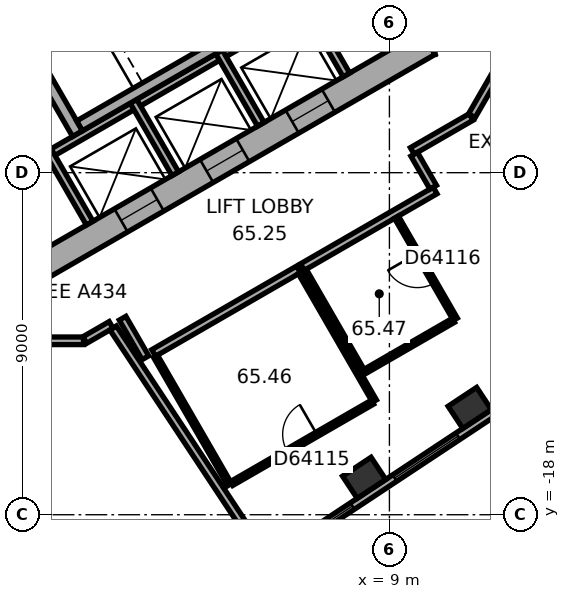
"""IFC4 building model, lengths in metres.
Left out: names, types, materials, properties, quantities, classifications, styles, units other than length and angle.
Written with IfcOpenShell. Run it as: python <this file> out.ifc"""

import sys

from ifc_helpers import new_model, si_unit, direction, frame, frame_2d, origin, origin_2d, place, context, subcontext, project, spatial, rectangle, extrude, element, fill, save


model = new_model("IFC4")
c1 = context("Model", 3, precision=1e-05, world=origin(), true_north=direction((0.0, 1.0)))
c2 = subcontext(c1, "Body", "Model", "MODEL_VIEW")
j1 = project(units=[si_unit("LENGTHUNIT", "METRE"), si_unit("PLANEANGLEUNIT", "RADIAN")], contexts=[c1])
p1 = place(None, origin())
s1 = spatial("IfcSite", under=j1, at=p1, CompositionType="ELEMENT")
p2 = place(p1, origin())
s2 = spatial("IfcBuilding", under=s1, at=p2, CompositionType="ELEMENT")
p3 = place(p2, frame((0.0, 0.0, 263.5)))
s3 = spatial("IfcBuildingStorey", under=s2, at=p3, CompositionType="ELEMENT", Elevation=263.5)
for number, where, z_axis, x_axis in (
    (1, (8.335, -17.028, 0.0), (0.0, 0.0, 1.0), (0.834, 0.552, 0.0)),
    (2, (11.113, -15.189, 0.0), (0.0, 0.0, 1.0), (0.834, 0.552, 0.0)),
):
    element("IfcColumn", number, at=place(p3, frame(where, z_axis=z_axis, x_axis=x_axis)), inside=s3, PredefinedType="COLUMN", context=c2, shape_type="SweptSolid", body=[
        extrude(rectangle(XDim=0.9, YDim=0.7, at=origin_2d()), origin(), (0.0, 0.0, 1.0), 3.7),
    ])
p4 = place(p3, frame((9.85, -5.889, 0.0), z_axis=(0.0, 0.0, 1.0), x_axis=(0.0, 1.0, 0.0)))
e3 = element("IfcWall", 3, at=p4, inside=s3, PredefinedType="SHEAR", context=c2, shape_type="SweptSolid", body=[
    extrude(rectangle(XDim=11.778, YDim=0.7, at=frame_2d((5.889, 0.0))), origin(), (0.0, 0.0, 1.0), 3.7),
])
p5 = place(p4, frame((6.089, 0.0, 0.0)))
e4 = element("IfcOpeningElement", 4, at=p5, cuts=e3, PredefinedType="OPENING", context=c2, shape_type="SweptSolid", body=[
    extrude(rectangle(XDim=1.5, YDim=2.1, at=frame_2d((0.75, 1.05))), frame((0.0, 0.36, 0.0), z_axis=(0.0, -1.0, 0.0), x_axis=(1.0, 0.0, 0.0)), (0.0, 0.0, 1.0), 0.72),
])
p6 = place(p4, frame((2.939, 0.0, 0.0)))
e5 = element("IfcOpeningElement", 5, at=p6, cuts=e3, PredefinedType="OPENING", context=c2, shape_type="SweptSolid", body=[
    extrude(rectangle(XDim=0.9, YDim=2.1, at=frame_2d((0.45, 1.05))), frame((0.0, 0.36, 0.0), z_axis=(0.0, -1.0, 0.0), x_axis=(1.0, 0.0, 0.0)), (0.0, 0.0, 1.0), 0.72),
])
p7 = place(p3, frame((-10.025, -5.586, 0.0), z_axis=(0.0, 0.0, 1.0), x_axis=(0.866026453023, -0.499998182661, 0.0)))
e6 = element("IfcWall", 6, at=p7, inside=s3, PredefinedType="SHEAR", context=c2, shape_type="SweptSolid", body=[
    extrude(rectangle(XDim=11.778, YDim=0.7, at=frame_2d((5.889, 0.0))), origin(), (0.0, 0.0, 1.0), 3.7),
])
p8 = place(p7, frame((6.089, 0.0, 0.0)))
e7 = element("IfcOpeningElement", 7, at=p8, cuts=e6, PredefinedType="OPENING", context=c2, shape_type="SweptSolid", body=[
    extrude(rectangle(XDim=1.5, YDim=2.1, at=frame_2d((0.75, 1.05))), frame((0.0, 0.36, 0.0), z_axis=(0.0, -1.0, 0.0), x_axis=(1.0, 0.0, 0.0)), (0.0, 0.0, 1.0), 0.72),
])
p9 = place(p7, frame((1.539, 0.0, 0.0)))
e8 = element("IfcOpeningElement", 8, at=p9, cuts=e6, PredefinedType="OPENING", context=c2, shape_type="SweptSolid", body=[
    extrude(rectangle(XDim=1.1, YDim=2.1, at=frame_2d((0.55, 1.05))), frame((0.0, 0.36, 0.0), z_axis=(0.0, -1.0, 0.0), x_axis=(1.0, 0.0, 0.0)), (0.0, 0.0, 1.0), 0.72),
])
p10 = place(p7, frame((4.139, 0.0, 0.0)))
e9 = element("IfcOpeningElement", 9, at=p10, cuts=e6, PredefinedType="OPENING", context=c2, shape_type="SweptSolid", body=[
    extrude(rectangle(XDim=1.1, YDim=2.1, at=frame_2d((0.55, 1.05))), frame((0.0, 0.36, 0.0), z_axis=(0.0, -1.0, 0.0), x_axis=(1.0, 0.0, 0.0)), (0.0, 0.0, 1.0), 0.72),
])
p11 = place(p3, frame((-0.175, -11.475, 0.0), z_axis=(0.0, 0.0, 1.0), x_axis=(0.866026453023, 0.499998182661, 0.0)))
e10 = element("IfcWall", 10, at=p11, inside=s3, PredefinedType="SHEAR", context=c2, shape_type="SweptSolid", body=[
    extrude(rectangle(XDim=11.778, YDim=0.7, at=frame_2d((5.889, 0.0))), origin(), (0.0, 0.0, 1.0), 3.7),
])
p12 = place(p11, frame((2.439, 0.0, 0.0)))
e11 = element("IfcOpeningElement", 11, at=p12, cuts=e10, PredefinedType="OPENING", context=c2, shape_type="SweptSolid", body=[
    extrude(rectangle(XDim=1.1, YDim=2.1, at=frame_2d((0.55, 1.05))), frame((0.0, 0.36, 0.0), z_axis=(0.0, -1.0, 0.0), x_axis=(1.0, 0.0, 0.0)), (0.0, 0.0, 1.0), 0.72),
])
p13 = place(p11, frame((5.039, 0.0, 0.0)))
e12 = element("IfcOpeningElement", 12, at=p13, cuts=e10, PredefinedType="OPENING", context=c2, shape_type="SweptSolid", body=[
    extrude(rectangle(XDim=1.1, YDim=2.1, at=frame_2d((0.55, 1.05))), frame((0.0, 0.36, 0.0), z_axis=(0.0, -1.0, 0.0), x_axis=(1.0, 0.0, 0.0)), (0.0, 0.0, 1.0), 0.72),
])
p14 = place(p11, frame((7.639, 0.0, 0.0)))
e13 = element("IfcOpeningElement", 13, at=p14, cuts=e10, PredefinedType="OPENING", context=c2, shape_type="SweptSolid", body=[
    extrude(rectangle(XDim=1.1, YDim=2.1, at=frame_2d((0.55, 1.05))), frame((0.0, 0.36, 0.0), z_axis=(0.0, -1.0, 0.0), x_axis=(1.0, 0.0, 0.0)), (0.0, 0.0, 1.0), 0.72),
])
p15 = place(p3, frame((2.58, -21.377, 0.0), z_axis=(0.0, 0.0, 1.0), x_axis=(0.833888592176, 0.551932800112, 0.0)))
e14 = element("IfcWall", 14, at=p15, inside=s3, PredefinedType="STANDARD", context=c2, shape_type="SweptSolid", body=[
    extrude(rectangle(XDim=17.731, YDim=0.2, at=frame_2d((8.866, 0.0))), origin(), (0.0, 0.0, 1.0), 3.7),
])
p16 = place(p15, frame((1.202, 0.0, 0.9)))
e15 = element("IfcOpeningElement", 15, at=p16, cuts=e14, PredefinedType="OPENING", context=c2, shape_type="SweptSolid", body=[
    extrude(rectangle(XDim=2.0, YDim=2.0, at=frame_2d((1.0, 1.0))), frame((0.0, 0.11, 0.0), z_axis=(0.0, -1.0, 0.0), x_axis=(1.0, 0.0, 0.0)), (0.0, 0.0, 1.0), 0.22),
])
p17 = place(p15, frame((4.533, 0.0, 0.9)))
e16 = element("IfcOpeningElement", 16, at=p17, cuts=e14, PredefinedType="OPENING", context=c2, shape_type="SweptSolid", body=[
    extrude(rectangle(XDim=2.0, YDim=2.0, at=frame_2d((1.0, 1.0))), frame((0.0, 0.11, 0.0), z_axis=(0.0, -1.0, 0.0), x_axis=(1.0, 0.0, 0.0)), (0.0, 0.0, 1.0), 0.22),
])
p18 = place(p15, frame((7.865, 0.0, 0.9)))
e17 = element("IfcOpeningElement", 17, at=p18, cuts=e14, PredefinedType="OPENING", context=c2, shape_type="SweptSolid", body=[
    extrude(rectangle(XDim=2.0, YDim=2.0, at=frame_2d((1.0, 1.0))), frame((0.0, 0.11, 0.0), z_axis=(0.0, -1.0, 0.0), x_axis=(1.0, 0.0, 0.0)), (0.0, 0.0, 1.0), 0.22),
])
p19 = place(p15, frame((11.197, 0.0, 0.9)))
e18 = element("IfcOpeningElement", 18, at=p19, cuts=e14, PredefinedType="OPENING", context=c2, shape_type="SweptSolid", body=[
    extrude(rectangle(XDim=2.0, YDim=2.0, at=frame_2d((1.0, 1.0))), frame((0.0, 0.11, 0.0), z_axis=(0.0, -1.0, 0.0), x_axis=(1.0, 0.0, 0.0)), (0.0, 0.0, 1.0), 0.22),
])
p20 = place(p15, frame((14.528, 0.0, 0.9)))
e19 = element("IfcOpeningElement", 19, at=p20, cuts=e14, PredefinedType="OPENING", context=c2, shape_type="SweptSolid", body=[
    extrude(rectangle(XDim=2.0, YDim=2.0, at=frame_2d((1.0, 1.0))), frame((0.0, 0.11, 0.0), z_axis=(0.0, -1.0, 0.0), x_axis=(1.0, 0.0, 0.0)), (0.0, 0.0, 1.0), 0.22),
])
p21 = place(p3, frame((-0.024, -8.559, 0.0), z_axis=(0.0, 0.0, 1.0), x_axis=(0.866026010844, 0.49999894854, 0.0)))
e20 = element("IfcWall", 20, at=p21, inside=s3, PredefinedType="PARTITIONING", context=c2, shape_type="SweptSolid", body=[
    extrude(rectangle(XDim=8.0, YDim=0.2, at=frame_2d((4.0, 0.0))), origin(), (0.0, 0.0, 1.0), 3.42),
])
for number, where, z_axis, x_axis in (
    (21, (0.013, -8.422, 0.0), (0.0, 0.0, 1.0), (0.5, -0.866, 0.0)),
    (22, (2.264, -7.122, 0.0), (0.0, 0.0, 1.0), (0.5, -0.866, 0.0)),
    (23, (4.516, -5.822, 0.0), (0.0, 0.0, 1.0), (0.5, -0.866, 0.0)),
    (24, (6.768, -4.522, 0.0), (0.0, 0.0, 1.0), (0.5, -0.866, 0.0)),
):
    element("IfcWall", number, at=place(p3, frame(where, z_axis=z_axis, x_axis=x_axis)), inside=s3, PredefinedType="PARTITIONING", context=c2, shape_type="SweptSolid", body=[
        extrude(rectangle(XDim=2.2, YDim=0.2, at=frame_2d((1.1, 0.0))), origin(), (0.0, 0.0, 1.0), 3.42),
    ])
p22 = place(p3, frame((-1.558, -3.902, 0.0), z_axis=(0.0, 0.0, 1.0), x_axis=(0.499977259774, -0.866038532462, 0.0)))
e25 = element("IfcWall", 25, at=p22, inside=s3, PredefinedType="SHEAR", context=c2, shape_type="SweptSolid", body=[
    extrude(rectangle(XDim=4.7, YDim=0.3, at=frame_2d((2.35, 0.0))), origin(), (0.0, 0.0, 1.0), 3.42),
])
p23 = place(p22, frame((0.8, 0.0, 0.0)))
e26 = element("IfcOpeningElement", 26, at=p23, cuts=e25, PredefinedType="OPENING", context=c2, shape_type="SweptSolid", body=[
    extrude(rectangle(XDim=1.2, YDim=2.1, at=frame_2d((0.6, 1.05))), frame((0.0, 0.16, 0.0), z_axis=(0.0, -1.0, 0.0), x_axis=(1.0, 0.0, 0.0)), (0.0, 0.0, 1.0), 0.32),
])
p24 = place(p3, frame((0.847, -7.767, 0.0), z_axis=(0.0, 0.0, 1.0), x_axis=(0.866027801685, 0.499995846692, 0.0)))
e27 = element("IfcWall", 27, at=p24, inside=s3, PredefinedType="SHEAR", context=c2, shape_type="SweptSolid", body=[
    extrude(rectangle(XDim=7.06, YDim=0.3, at=frame_2d((3.53, 0.0))), origin(), (0.0, 0.0, 1.0), 3.42),
])
p25 = place(p3, frame((-0.91, -13.423, 0.0), z_axis=(0.0, 0.0, 1.0), x_axis=(1.0, 0.0, 0.0)))
e28 = element("IfcWall", 28, at=p25, inside=s3, PredefinedType="PARTITIONING", context=c2, shape_type="SweptSolid", body=[
    extrude(rectangle(XDim=1.86, YDim=0.2, at=frame_2d((0.93, 0.0))), origin(), (0.0, 0.0, 1.0), 3.42),
])
p26 = place(p3, frame((0.985, -13.403, 0.0), z_axis=(0.0, 0.0, 1.0), x_axis=(0.866032814021, 0.499987164874, 0.0)))
e29 = element("IfcWall", 29, at=p26, inside=s3, PredefinedType="PARTITIONING", context=c2, shape_type="SweptSolid", body=[
    extrude(rectangle(XDim=0.798, YDim=0.2, at=frame_2d((0.399, 0.0))), origin(), (0.0, 0.0, 1.0), 3.42),
])
p27 = place(p3, frame((1.979, -12.829, 0.0), z_axis=(0.0, 0.0, 1.0), x_axis=(0.500074377092, -0.865982457891, 0.0)))
e30 = element("IfcWall", 30, at=p27, inside=s3, PredefinedType="PARTITIONING", context=c2, shape_type="SweptSolid", body=[
    extrude(rectangle(XDim=1.201, YDim=0.2, at=frame_2d((0.601, 0.0))), origin(), (0.0, 0.0, 1.0), 3.42),
])
p28 = place(p3, frame((2.796, -13.744, 0.0), z_axis=(0.0, 0.0, 1.0), x_axis=(0.866018331238, 0.50001224981, 0.0)))
e31 = element("IfcWall", 31, at=p28, inside=s3, PredefinedType="PARTITIONING", context=c2, shape_type="SweptSolid", body=[
    extrude(rectangle(XDim=4.4, YDim=0.2, at=frame_2d((2.2, 0.0))), origin(), (0.0, 0.0, 1.0), 3.42),
])
p29 = place(p3, frame((4.796, -17.208, 0.0), z_axis=(0.0, 0.0, 1.0), x_axis=(-0.500043961785, 0.866000020948, 0.0)))
e32 = element("IfcWall", 32, at=p29, inside=s3, PredefinedType="PARTITIONING", context=c2, shape_type="SweptSolid", body=[
    extrude(rectangle(XDim=3.9, YDim=0.12, at=frame_2d((1.95, 0.0))), origin(), (0.0, 0.0, 1.0), 3.42),
])
p30 = place(p3, frame((5.364, -18.575, 0.0), z_axis=(0.0, 0.0, 1.0), x_axis=(-0.55195757761, 0.833872191957, 0.0)))
e33 = element("IfcWall", 33, at=p30, inside=s3, PredefinedType="PARTITIONING", context=c2, shape_type="SweptSolid", body=[
    extrude(rectangle(XDim=6.581, YDim=0.2, at=frame_2d((3.291, 0.0))), origin(), (0.0, 0.0, 1.0), 3.42),
])
p31 = place(p3, frame((6.656, -11.631, 0.0), z_axis=(0.0, 0.0, 1.0), x_axis=(0.499997012787, -0.866027128446, 0.0)))
e34 = element("IfcWall", 34, at=p31, inside=s3, PredefinedType="PARTITIONING", context=c2, shape_type="SweptSolid", body=[
    extrude(rectangle(XDim=3.9, YDim=0.12, at=frame_2d((1.95, 0.0))), origin(), (0.0, 0.0, 1.0), 3.42),
])
p32 = place(p3, frame((6.71, -11.485, 0.0), z_axis=(0.0, 0.0, 1.0), x_axis=(0.866021232452, 0.500007224889, 0.0)))
e35 = element("IfcWall", 35, at=p32, inside=s3, PredefinedType="PARTITIONING", context=c2, shape_type="SweptSolid", body=[
    extrude(rectangle(XDim=4.032, YDim=0.2, at=frame_2d((2.016, 0.0))), origin(), (0.0, 0.0, 1.0), 3.42),
])
p33 = place(p3, frame((8.31, -14.256, 0.0), z_axis=(0.0, 0.0, 1.0), x_axis=(-0.49999285859, 0.86602952684, 0.0)))
e36 = element("IfcWall", 36, at=p33, inside=s3, PredefinedType="PARTITIONING", context=c2, shape_type="SweptSolid", body=[
    extrude(rectangle(XDim=3.1, YDim=0.12, at=frame_2d((1.55, 0.0))), origin(), (0.0, 0.0, 1.0), 3.42),
])
p34 = place(p3, frame((8.554, -15.039, 0.0), z_axis=(0.0, 0.0, 1.0), x_axis=(-0.865994635417, -0.500053288589, 0.0)))
e37 = element("IfcWall", 37, at=p34, inside=s3, PredefinedType="PARTITIONING", context=c2, shape_type="SweptSolid", body=[
    extrude(rectangle(XDim=4.28, YDim=0.12, at=frame_2d((2.14, 0.0))), origin(), (0.0, 0.0, 1.0), 3.42),
])
p35 = place(p34, frame((1.69, 0.0, 0.0)))
e38 = element("IfcOpeningElement", 38, at=p35, cuts=e37, PredefinedType="OPENING", context=c2, shape_type="SweptSolid", body=[
    extrude(rectangle(XDim=0.9, YDim=2.1, at=frame_2d((0.45, 1.05))), frame((0.0, 0.07, 0.0), z_axis=(0.0, -1.0, 0.0), x_axis=(1.0, 0.0, 0.0)), (0.0, 0.0, 1.0), 0.14),
])
p36 = place(p3, frame((9.185, -10.171, 0.0), z_axis=(0.0, 0.0, 1.0), x_axis=(0.500026960575, -0.86600983753, 0.0)))
e39 = element("IfcWall", 39, at=p36, inside=s3, PredefinedType="PARTITIONING", context=c2, shape_type="SweptSolid", body=[
    extrude(rectangle(XDim=3.1, YDim=0.12, at=frame_2d((1.55, 0.0))), origin(), (0.0, 0.0, 1.0), 3.42),
])
p37 = place(p36, frame((1.1, 0.0, 0.0)))
e40 = element("IfcOpeningElement", 40, at=p37, cuts=e39, PredefinedType="OPENING", context=c2, shape_type="SweptSolid", body=[
    extrude(rectangle(XDim=0.9, YDim=2.1, at=frame_2d((0.45, 1.05))), frame((0.0, 0.07, 0.0), z_axis=(0.0, -1.0, 0.0), x_axis=(1.0, 0.0, 0.0)), (0.0, 0.0, 1.0), 0.14),
])
p38 = place(p3, frame((9.602, -8.428, 0.0), z_axis=(0.0, 0.0, 1.0), x_axis=(0.865999114786, 0.500045531117, 0.0)))
e41 = element("IfcWall", 41, at=p38, inside=s3, PredefinedType="PARTITIONING", context=c2, shape_type="SweptSolid", body=[
    extrude(rectangle(XDim=1.788, YDim=0.2, at=frame_2d((0.894, 0.0))), origin(), (0.0, 0.0, 1.0), 3.42),
])
p39 = place(p3, frame((10.152, -9.382, 0.0), z_axis=(0.0, 0.0, 1.0), x_axis=(-0.499968756647, 0.866043441391, 0.0)))
e42 = element("IfcWall", 42, at=p39, inside=s3, PredefinedType="PARTITIONING", context=c2, shape_type="SweptSolid", body=[
    extrude(rectangle(XDim=1.001, YDim=0.2, at=frame_2d((0.5, 0.0))), origin(), (0.0, 0.0, 1.0), 3.42),
])
p40 = place(p3, frame((10.683, -12.886, 0.0), z_axis=(0.0, 0.0, 1.0), x_axis=(-0.86599746015, -0.500048396672, 0.0)))
e43 = element("IfcWall", 43, at=p40, inside=s3, PredefinedType="PARTITIONING", context=c2, shape_type="SweptSolid", body=[
    extrude(rectangle(XDim=2.68, YDim=0.12, at=frame_2d((1.34, 0.0))), origin(), (0.0, 0.0, 1.0), 3.42),
])
p41 = place(p3, frame((11.17, -7.5, 0.0), z_axis=(0.0, 0.0, 1.0), x_axis=(0.500006454166, 0.866021677438, 0.0)))
e44 = element("IfcWall", 44, at=p41, inside=s3, PredefinedType="PARTITIONING", context=c2, shape_type="SweptSolid", body=[
    extrude(rectangle(XDim=1.86, YDim=0.2, at=frame_2d((0.93, 0.0))), origin(), (0.0, 0.0, 1.0), 3.42),
])
p42 = place(p17, origin())
e45 = element("IfcWindow", 45, at=p42, inside=s3, PartitioningType="SINGLE_PANEL", PredefinedType="WINDOW", context=c2, shape_type="SweptSolid", body=[
    extrude(rectangle(XDim=2.0, YDim=2.0, at=frame_2d((1.0, 1.0))), frame((0.0, 0.03, 0.0), z_axis=(0.0, -1.0, 0.0), x_axis=(1.0, 0.0, 0.0)), (0.0, 0.0, 1.0), 0.06),
])
fill(e16, e45)
p43 = place(p18, origin())
e46 = element("IfcWindow", 46, at=p43, inside=s3, PartitioningType="SINGLE_PANEL", PredefinedType="WINDOW", context=c2, shape_type="SweptSolid", body=[
    extrude(rectangle(XDim=2.0, YDim=2.0, at=frame_2d((1.0, 1.0))), frame((0.0, 0.03, 0.0), z_axis=(0.0, -1.0, 0.0), x_axis=(1.0, 0.0, 0.0)), (0.0, 0.0, 1.0), 0.06),
])
fill(e17, e46)
p44 = place(p12, origin())
e47 = element("IfcDoor", 47, at=p44, inside=s3, OperationType="DOUBLE_DOOR_SLIDING", PredefinedType="DOOR", context=c2, shape_type="SweptSolid", body=[
    extrude(rectangle(XDim=1.1, YDim=2.1, at=frame_2d((0.55, 1.05))), frame((0.0, 0.025, 0.0), z_axis=(0.0, -1.0, 0.0), x_axis=(1.0, 0.0, 0.0)), (0.0, 0.0, 1.0), 0.05),
])
fill(e11, e47)
p45 = place(p13, origin())
e48 = element("IfcDoor", 48, at=p45, inside=s3, OperationType="DOUBLE_DOOR_SLIDING", PredefinedType="DOOR", context=c2, shape_type="SweptSolid", body=[
    extrude(rectangle(XDim=1.1, YDim=2.1, at=frame_2d((0.55, 1.05))), frame((0.0, 0.025, 0.0), z_axis=(0.0, -1.0, 0.0), x_axis=(1.0, 0.0, 0.0)), (0.0, 0.0, 1.0), 0.05),
])
fill(e12, e48)
p46 = place(p14, origin())
e49 = element("IfcDoor", 49, at=p46, inside=s3, OperationType="DOUBLE_DOOR_SLIDING", PredefinedType="DOOR", context=c2, shape_type="SweptSolid", body=[
    extrude(rectangle(XDim=1.1, YDim=2.1, at=frame_2d((0.55, 1.05))), frame((0.0, 0.025, 0.0), z_axis=(0.0, -1.0, 0.0), x_axis=(1.0, 0.0, 0.0)), (0.0, 0.0, 1.0), 0.05),
])
fill(e13, e49)
p47 = place(p35, origin())
e50 = element("IfcDoor", 50, at=p47, inside=s3, OperationType="SINGLE_SWING_LEFT", PredefinedType="DOOR", context=c2, shape_type="SweptSolid", body=[
    extrude(rectangle(XDim=0.9, YDim=2.1, at=frame_2d((0.45, 1.05))), frame((0.0, 0.025, 0.0), z_axis=(0.0, -1.0, 0.0), x_axis=(1.0, 0.0, 0.0)), (0.0, 0.0, 1.0), 0.05),
])
fill(e38, e50)
p48 = place(p37, origin())
e51 = element("IfcDoor", 51, at=p48, inside=s3, OperationType="SINGLE_SWING_LEFT", PredefinedType="DOOR", context=c2, shape_type="SweptSolid", body=[
    extrude(rectangle(XDim=0.9, YDim=2.1, at=frame_2d((0.45, 1.05))), frame((0.0, 0.025, 0.0), z_axis=(0.0, -1.0, 0.0), x_axis=(1.0, 0.0, 0.0)), (0.0, 0.0, 1.0), 0.05),
])
fill(e40, e51)
save(model, sys.argv[1])
